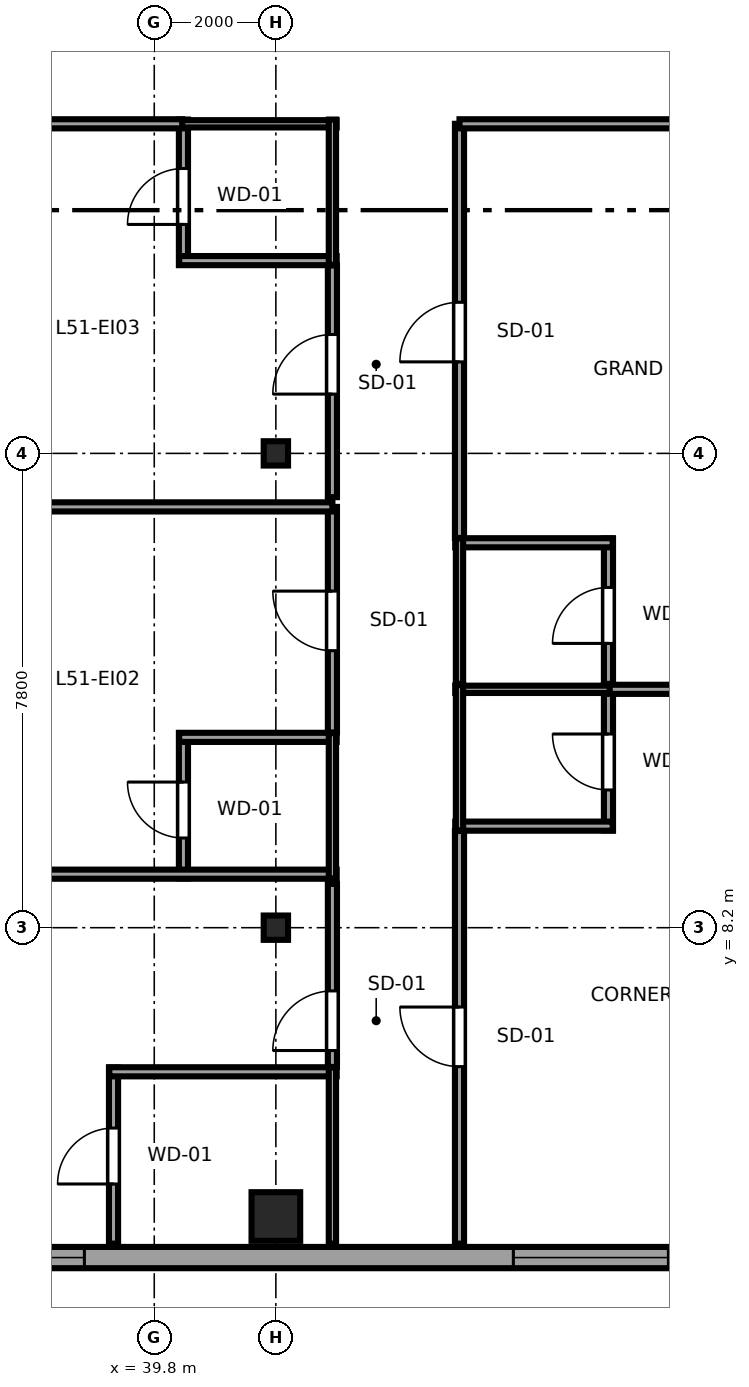
"""IFC4 building model, lengths in metres.
Left out: names, types, materials, properties, quantities, classifications, styles, units other than length and angle.
Written with IfcOpenShell. Run it as: python <this file> out.ifc"""

import sys

from ifc_helpers import new_model, si_unit, direction, frame, frame_2d, origin, origin_2d, place, context, subcontext, project, spatial, rectangle, i_section, extrude, source, transform, mapped, element, fill, save


model = new_model("IFC4")
c1 = context("Model", 3, precision=1e-05, world=origin(), true_north=direction((0.0, 1.0)))
c2 = subcontext(c1, "Body", "Model", "MODEL_VIEW")
j1 = project(units=[si_unit("LENGTHUNIT", "METRE"), si_unit("PLANEANGLEUNIT", "RADIAN")], contexts=[c1])
p1 = place(None, origin())
s1 = spatial("IfcSite", under=j1, at=p1, CompositionType="ELEMENT")
p2 = place(p1, origin())
s2 = spatial("IfcBuilding", under=s1, at=p2, CompositionType="ELEMENT")
p3 = place(p2, frame((0.0, 0.0, 194.65)))
s3 = spatial("IfcBuildingStorey", under=s2, at=p3, CompositionType="ELEMENT", Elevation=194.65)
m1 = source(origin(), c2, "Body", "SweptSolid", [
    extrude(rectangle(XDim=0.8, YDim=0.8, at=origin_2d()), origin(), (0.0, 0.0, 1.0), 3.55),
])
p4 = place(p3, frame((41.8, 3.45, 0.0), z_axis=(0.0, 0.0, 1.0), x_axis=(1.0, 0.0, 0.0)))
e1 = element("IfcColumn", 1, at=p4, inside=s3, PredefinedType="COLUMN", context=c2, shape_type="MappedRepresentation", body=[
    mapped(m1, transform((0.0, 0.0, 0.0), x_axis=(1.0, 0.0, 0.0), y_axis=(0.0, 1.0, 0.0), z_axis=(0.0, 0.0, 1.0), scale=1.0)),
])
m2 = source(origin(), c2, "Body", "SweptSolid", [
    extrude(i_section(OverallWidth=0.4, OverallDepth=0.4, WebThickness=0.02, FlangeThickness=0.035, at=origin_2d()), origin(), (0.0, 0.0, 1.0), 3.55),
])
for number, where, z_axis, x_axis in (
    (2, (41.8, 8.2, 0.0), (0.0, 0.0, 1.0), (1.0, 0.0, 0.0)),
    (3, (41.8, 16.0, 0.0), (0.0, 0.0, 1.0), (1.0, 0.0, 0.0)),
):
    element("IfcColumn", number, at=place(p3, frame(where, z_axis=z_axis, x_axis=x_axis)), inside=s3, PredefinedType="COLUMN", context=c2, shape_type="MappedRepresentation", body=[
        mapped(m2, transform((0.0, 0.0, 0.0), x_axis=(1.0, 0.0, 0.0), y_axis=(0.0, 1.0, 0.0), z_axis=(0.0, 0.0, 1.0), scale=1.0)),
    ])
p5 = place(p3, frame((34.375, 2.775, 0.0), z_axis=(0.0, 0.0, 1.0), x_axis=(1.0, 0.0, 0.0)))
e4 = element("IfcWall", 4, at=p5, inside=s3, PredefinedType="SOLIDWALL", context=c2, shape_type="SweptSolid", body=[
    extrude(rectangle(XDim=15.608, YDim=0.35, at=frame_2d((7.804, 0.0))), origin(), (0.0, 0.0, 1.0), 3.37),
])
p6 = place(p5, frame((1.726, 0.0, 0.68)))
e5 = element("IfcOpeningElement", 5, at=p6, cuts=e4, PredefinedType="OPENING", context=c2, shape_type="SweptSolid", body=[
    extrude(rectangle(XDim=2.55, YDim=1.92, at=frame_2d((1.275, 0.96))), frame((0.0, 0.185, 0.0), z_axis=(0.0, -1.0, 0.0), x_axis=(1.0, 0.0, 0.0)), (0.0, 0.0, 1.0), 0.37),
])
p7 = place(p5, frame((11.331, 0.0, 0.68)))
e6 = element("IfcOpeningElement", 6, at=p7, cuts=e4, PredefinedType="OPENING", context=c2, shape_type="SweptSolid", body=[
    extrude(rectangle(XDim=2.55, YDim=1.92, at=frame_2d((1.275, 0.96))), frame((0.0, 0.185, 0.0), z_axis=(0.0, -1.0, 0.0), x_axis=(1.0, 0.0, 0.0)), (0.0, 0.0, 1.0), 0.37),
])
p8 = place(p3, frame((39.13, 3.005, 0.0), z_axis=(0.0, 0.0, 1.0), x_axis=(0.0, 1.0, 0.0)))
e7 = element("IfcWall", 7, at=p8, inside=s3, PredefinedType="PARTITIONING", context=c2, shape_type="SweptSolid", body=[
    extrude(rectangle(XDim=2.895, YDim=0.15, at=frame_2d((1.448, 0.0))), origin(), (0.0, 0.0, 1.0), 3.37),
])
p9 = place(p8, frame((0.98, 0.0, 0.0)))
e8 = element("IfcOpeningElement", 8, at=p9, cuts=e7, PredefinedType="OPENING", context=c2, shape_type="SweptSolid", body=[
    extrude(rectangle(XDim=0.92, YDim=2.01, at=frame_2d((0.46, 1.005))), frame((0.0, 0.085, 0.0), z_axis=(0.0, -1.0, 0.0), x_axis=(1.0, 0.0, 0.0)), (0.0, 0.0, 1.0), 0.17),
])
p10 = place(p3, frame((39.06, 5.83, 0.0), z_axis=(0.0, 0.0, 1.0), x_axis=(1.0, 0.0, 0.0)))
e9 = element("IfcWall", 9, at=p10, inside=s3, PredefinedType="PARTITIONING", context=c2, shape_type="SweptSolid", body=[
    extrude(rectangle(XDim=3.74, YDim=0.15, at=frame_2d((1.87, 0.0))), origin(), (0.0, 0.0, 1.0), 3.37),
])
p11 = place(p3, frame((42.73, 3.005, 0.0), z_axis=(0.0, 0.0, 1.0), x_axis=(0.0, 1.0, 0.0)))
e10 = element("IfcWall", 10, at=p11, inside=s3, PredefinedType="PLUMBINGWALL", context=c2, shape_type="SweptSolid", body=[
    extrude(rectangle(XDim=2.895, YDim=0.12, at=frame_2d((1.448, 0.0))), origin(), (0.0, 0.0, 1.0), 3.37),
])
p12 = place(p3, frame((40.28, 9.01, 0.0), z_axis=(0.0, 0.0, 1.0), x_axis=(0.0, 1.0, 0.0)))
e11 = element("IfcWall", 11, at=p12, inside=s3, PredefinedType="PARTITIONING", context=c2, shape_type="SweptSolid", body=[
    extrude(rectangle(XDim=2.39, YDim=0.15, at=frame_2d((1.195, 0.0))), origin(), (0.0, 0.0, 1.0), 3.37),
])
p13 = place(p12, frame((0.665, 0.0, 0.0)))
e12 = element("IfcOpeningElement", 12, at=p13, cuts=e11, PredefinedType="OPENING", context=c2, shape_type="SweptSolid", body=[
    extrude(rectangle(XDim=0.92, YDim=2.01, at=frame_2d((0.46, 1.005))), frame((0.0, 0.085, 0.0), z_axis=(0.0, -1.0, 0.0), x_axis=(1.0, 0.0, 0.0)), (0.0, 0.0, 1.0), 0.17),
])
p14 = place(p3, frame((34.65, 9.08, 0.0), z_axis=(0.0, 0.0, 1.0), x_axis=(1.0, 0.0, 0.0)))
e13 = element("IfcWall", 13, at=p14, inside=s3, PredefinedType="PARTITIONING", context=c2, shape_type="SweptSolid", body=[
    extrude(rectangle(XDim=8.15, YDim=0.15, at=frame_2d((4.075, 0.0))), origin(), (0.0, 0.0, 1.0), 3.37),
])
p15 = place(p3, frame((40.21, 11.33, 0.0), z_axis=(0.0, 0.0, 1.0), x_axis=(1.0, 0.0, 0.0)))
e14 = element("IfcWall", 14, at=p15, inside=s3, PredefinedType="PARTITIONING", context=c2, shape_type="SweptSolid", body=[
    extrude(rectangle(XDim=2.59, YDim=0.15, at=frame_2d((1.295, 0.0))), origin(), (0.0, 0.0, 1.0), 3.37),
])
p16 = place(p3, frame((42.73, 9.01, 0.0), z_axis=(0.0, 0.0, 1.0), x_axis=(0.0, 1.0, 0.0)))
e15 = element("IfcWall", 15, at=p16, inside=s3, PredefinedType="PLUMBINGWALL", context=c2, shape_type="SweptSolid", body=[
    extrude(rectangle(XDim=2.39, YDim=0.12, at=frame_2d((1.195, 0.0))), origin(), (0.0, 0.0, 1.0), 3.37),
])
p17 = place(p3, frame((40.28, 19.1, 0.0), z_axis=(0.0, 0.0, 1.0), x_axis=(0.0, 1.0, 0.0)))
e16 = element("IfcWall", 16, at=p17, inside=s3, PredefinedType="PARTITIONING", context=c2, shape_type="SweptSolid", body=[
    extrude(rectangle(XDim=2.39, YDim=0.15, at=frame_2d((1.195, 0.0))), origin(), (0.0, 0.0, 1.0), 3.37),
])
p18 = place(p17, frame((0.665, 0.0, 0.0)))
e17 = element("IfcOpeningElement", 17, at=p18, cuts=e16, PredefinedType="OPENING", context=c2, shape_type="SweptSolid", body=[
    extrude(rectangle(XDim=0.92, YDim=2.01, at=frame_2d((0.46, 1.005))), frame((0.0, 0.085, 0.0), z_axis=(0.0, -1.0, 0.0), x_axis=(1.0, 0.0, 0.0)), (0.0, 0.0, 1.0), 0.17),
])
p19 = place(p3, frame((40.21, 19.17, 0.0), z_axis=(0.0, 0.0, 1.0), x_axis=(1.0, 0.0, 0.0)))
e18 = element("IfcWall", 18, at=p19, inside=s3, PredefinedType="PARTITIONING", context=c2, shape_type="SweptSolid", body=[
    extrude(rectangle(XDim=2.59, YDim=0.15, at=frame_2d((1.295, 0.0))), origin(), (0.0, 0.0, 1.0), 3.37),
])
p20 = place(p3, frame((40.21, 21.42, 0.0), z_axis=(0.0, 0.0, 1.0), x_axis=(1.0, 0.0, 0.0)))
e19 = element("IfcWall", 19, at=p20, inside=s3, PredefinedType="PLUMBINGWALL", context=c2, shape_type="SweptSolid", body=[
    extrude(rectangle(XDim=2.59, YDim=0.12, at=frame_2d((1.295, 0.0))), origin(), (0.0, 0.0, 1.0), 3.37),
])
p21 = place(p3, frame((42.73, 19.1, 0.0), z_axis=(0.0, 0.0, 1.0), x_axis=(0.0, 1.0, 0.0)))
e20 = element("IfcWall", 20, at=p21, inside=s3, PredefinedType="PLUMBINGWALL", context=c2, shape_type="SweptSolid", body=[
    extrude(rectangle(XDim=2.39, YDim=0.12, at=frame_2d((1.195, 0.0))), origin(), (0.0, 0.0, 1.0), 3.37),
])
p22 = place(p3, frame((47.27, 9.8, 0.0), z_axis=(0.0, 0.0, 1.0), x_axis=(0.0, 1.0, 0.0)))
e21 = element("IfcWall", 21, at=p22, inside=s3, PredefinedType="PARTITIONING", context=c2, shape_type="SweptSolid", body=[
    extrude(rectangle(XDim=2.39, YDim=0.15, at=frame_2d((1.195, 0.0))), origin(), (0.0, 0.0, 1.0), 3.37),
])
p23 = place(p22, frame((0.665, 0.0, 0.0)))
e22 = element("IfcOpeningElement", 22, at=p23, cuts=e21, PredefinedType="OPENING", context=c2, shape_type="SweptSolid", body=[
    extrude(rectangle(XDim=0.92, YDim=2.01, at=frame_2d((0.46, 1.005))), frame((0.0, 0.085, 0.0), z_axis=(0.0, -1.0, 0.0), x_axis=(1.0, 0.0, 0.0)), (0.0, 0.0, 1.0), 0.17),
])
p24 = place(p3, frame((44.75, 9.87, 0.0), z_axis=(0.0, 0.0, 1.0), x_axis=(1.0, 0.0, 0.0)))
e23 = element("IfcWall", 23, at=p24, inside=s3, PredefinedType="PARTITIONING", context=c2, shape_type="SweptSolid", body=[
    extrude(rectangle(XDim=2.59, YDim=0.15, at=frame_2d((1.295, 0.0))), origin(), (0.0, 0.0, 1.0), 3.37),
])
p25 = place(p3, frame((44.75, 12.12, 0.0), z_axis=(0.0, 0.0, 1.0), x_axis=(1.0, 0.0, 0.0)))
e24 = element("IfcWall", 24, at=p25, inside=s3, PredefinedType="PLUMBINGWALL", context=c2, shape_type="SweptSolid", body=[
    extrude(rectangle(XDim=2.59, YDim=0.12, at=frame_2d((1.295, 0.0))), origin(), (0.0, 0.0, 1.0), 3.37),
])
p26 = place(p3, frame((44.82, 9.8, 0.0), z_axis=(0.0, 0.0, 1.0), x_axis=(0.0, 1.0, 0.0)))
e25 = element("IfcWall", 25, at=p26, inside=s3, PredefinedType="PLUMBINGWALL", context=c2, shape_type="SweptSolid", body=[
    extrude(rectangle(XDim=2.39, YDim=0.12, at=frame_2d((1.195, 0.0))), origin(), (0.0, 0.0, 1.0), 3.37),
])
p27 = place(p3, frame((47.27, 12.21, 0.0), z_axis=(0.0, 0.0, 1.0), x_axis=(0.0, 1.0, 0.0)))
e26 = element("IfcWall", 26, at=p27, inside=s3, PredefinedType="PARTITIONING", context=c2, shape_type="SweptSolid", body=[
    extrude(rectangle(XDim=2.39, YDim=0.15, at=frame_2d((1.195, 0.0))), origin(), (0.0, 0.0, 1.0), 3.37),
])
p28 = place(p27, frame((0.665, 0.0, 0.0)))
e27 = element("IfcOpeningElement", 27, at=p28, cuts=e26, PredefinedType="OPENING", context=c2, shape_type="SweptSolid", body=[
    extrude(rectangle(XDim=0.92, YDim=2.01, at=frame_2d((0.46, 1.005))), frame((0.0, 0.085, 0.0), z_axis=(0.0, -1.0, 0.0), x_axis=(1.0, 0.0, 0.0)), (0.0, 0.0, 1.0), 0.17),
])
p29 = place(p3, frame((44.75, 14.53, 0.0), z_axis=(0.0, 0.0, 1.0), x_axis=(1.0, 0.0, 0.0)))
e28 = element("IfcWall", 28, at=p29, inside=s3, PredefinedType="PARTITIONING", context=c2, shape_type="SweptSolid", body=[
    extrude(rectangle(XDim=2.59, YDim=0.15, at=frame_2d((1.295, 0.0))), origin(), (0.0, 0.0, 1.0), 3.37),
])
p30 = place(p3, frame((44.82, 12.21, 0.0), z_axis=(0.0, 0.0, 1.0), x_axis=(0.0, 1.0, 0.0)))
e29 = element("IfcWall", 29, at=p30, inside=s3, PredefinedType="PLUMBINGWALL", context=c2, shape_type="SweptSolid", body=[
    extrude(rectangle(XDim=2.39, YDim=0.12, at=frame_2d((1.195, 0.0))), origin(), (0.0, 0.0, 1.0), 3.37),
])
p31 = place(p3, frame((42.73, 5.91, 0.0), z_axis=(0.0, 0.0, 1.0), x_axis=(0.0, 1.0, 0.0)))
e30 = element("IfcWall", 30, at=p31, inside=s3, PredefinedType="PARTITIONING", context=c2, shape_type="SweptSolid", body=[
    extrude(rectangle(XDim=3.01, YDim=0.15, at=frame_2d((1.505, 0.0))), origin(), (0.0, 0.0, 1.0), 3.37),
])
p32 = place(p31, frame((0.27, 0.0, 0.0)))
e31 = element("IfcOpeningElement", 31, at=p32, cuts=e30, PredefinedType="OPENING", context=c2, shape_type="SweptSolid", body=[
    extrude(rectangle(XDim=0.98, YDim=2.12, at=frame_2d((0.49, 1.06))), frame((0.0, 0.085, 0.0), z_axis=(0.0, -1.0, 0.0), x_axis=(1.0, 0.0, 0.0)), (0.0, 0.0, 1.0), 0.17),
])
p33 = place(p3, frame((42.73, 11.41, 0.0), z_axis=(0.0, 0.0, 1.0), x_axis=(0.0, 1.0, 0.0)))
e32 = element("IfcWall", 32, at=p33, inside=s3, PredefinedType="PARTITIONING", context=c2, shape_type="SweptSolid", body=[
    extrude(rectangle(XDim=3.71, YDim=0.15, at=frame_2d((1.855, 0.0))), origin(), (0.0, 0.0, 1.0), 3.37),
])
p34 = place(p33, frame((1.345, 0.0, 0.0)))
e33 = element("IfcOpeningElement", 33, at=p34, cuts=e32, PredefinedType="OPENING", context=c2, shape_type="SweptSolid", body=[
    extrude(rectangle(XDim=0.98, YDim=2.12, at=frame_2d((0.49, 1.06))), frame((0.0, 0.085, 0.0), z_axis=(0.0, -1.0, 0.0), x_axis=(1.0, 0.0, 0.0)), (0.0, 0.0, 1.0), 0.17),
])
p35 = place(p3, frame((34.65, 15.12, 0.0), z_axis=(0.0, 0.0, 1.0), x_axis=(1.0, 0.0, 0.0)))
e34 = element("IfcWall", 34, at=p35, inside=s3, PredefinedType="PARTITIONING", context=c2, shape_type="SweptSolid", body=[
    extrude(rectangle(XDim=8.08, YDim=0.15, at=frame_2d((4.04, 0.0))), origin(), (0.0, 0.0, 1.0), 3.37),
])
p36 = place(p3, frame((42.73, 15.28, 0.0), z_axis=(0.0, 0.0, 1.0), x_axis=(0.0, 1.0, 0.0)))
e35 = element("IfcWall", 35, at=p36, inside=s3, PredefinedType="PARTITIONING", context=c2, shape_type="SweptSolid", body=[
    extrude(rectangle(XDim=3.81, YDim=0.15, at=frame_2d((1.905, 0.0))), origin(), (0.0, 0.0, 1.0), 3.37),
])
p37 = place(p36, frame((1.695, 0.0, 0.0)))
e36 = element("IfcOpeningElement", 36, at=p37, cuts=e35, PredefinedType="OPENING", context=c2, shape_type="SweptSolid", body=[
    extrude(rectangle(XDim=0.98, YDim=2.12, at=frame_2d((0.49, 1.06))), frame((0.0, 0.085, 0.0), z_axis=(0.0, -1.0, 0.0), x_axis=(1.0, 0.0, 0.0)), (0.0, 0.0, 1.0), 0.17),
])
p38 = place(p3, frame((34.65, 21.42, 0.0), z_axis=(0.0, 0.0, 1.0), x_axis=(1.0, 0.0, 0.0)))
e37 = element("IfcWall", 37, at=p38, inside=s3, PredefinedType="PARTITIONING", context=c2, shape_type="SweptSolid", body=[
    extrude(rectangle(XDim=5.61, YDim=0.15, at=frame_2d((2.805, 0.0))), origin(), (0.0, 0.0, 1.0), 3.37),
])
p39 = place(p3, frame((44.82, 3.005, 0.0), z_axis=(0.0, 0.0, 1.0), x_axis=(0.0, 1.0, 0.0)))
e38 = element("IfcWall", 38, at=p39, inside=s3, PredefinedType="PARTITIONING", context=c2, shape_type="SweptSolid", body=[
    extrude(rectangle(XDim=6.785, YDim=0.15, at=frame_2d((3.393, 0.0))), origin(), (0.0, 0.0, 1.0), 3.37),
])
p40 = place(p39, frame((2.91, 0.0, 0.0)))
e39 = element("IfcOpeningElement", 39, at=p40, cuts=e38, PredefinedType="OPENING", context=c2, shape_type="SweptSolid", body=[
    extrude(rectangle(XDim=0.98, YDim=2.12, at=frame_2d((0.49, 1.06))), frame((0.0, 0.085, 0.0), z_axis=(0.0, -1.0, 0.0), x_axis=(1.0, 0.0, 0.0)), (0.0, 0.0, 1.0), 0.17),
])
p41 = place(p3, frame((47.29, 12.12, 0.0), z_axis=(0.0, 0.0, 1.0), x_axis=(1.0, 0.0, 0.0)))
e40 = element("IfcWall", 40, at=p41, inside=s3, PredefinedType="PARTITIONING", context=c2, shape_type="SweptSolid", body=[
    extrude(rectangle(XDim=6.705, YDim=0.15, at=frame_2d((3.353, 0.0))), origin(), (0.0, 0.0, 1.0), 3.37),
])
p42 = place(p3, frame((44.82, 14.61, 0.0), z_axis=(0.0, 0.0, 1.0), x_axis=(0.0, 1.0, 0.0)))
e41 = element("IfcWall", 41, at=p42, inside=s3, PredefinedType="PARTITIONING", context=c2, shape_type="SweptSolid", body=[
    extrude(rectangle(XDim=6.81, YDim=0.15, at=frame_2d((3.405, 0.0))), origin(), (0.0, 0.0, 1.0), 3.37),
])
p43 = place(p42, frame((2.895, 0.0, 0.0)))
e42 = element("IfcOpeningElement", 42, at=p43, cuts=e41, PredefinedType="OPENING", context=c2, shape_type="SweptSolid", body=[
    extrude(rectangle(XDim=0.98, YDim=2.12, at=frame_2d((0.49, 1.06))), frame((0.0, 0.085, 0.0), z_axis=(0.0, -1.0, 0.0), x_axis=(1.0, 0.0, 0.0)), (0.0, 0.0, 1.0), 0.17),
])
p44 = place(p3, frame((44.82, 21.42, 0.0), z_axis=(0.0, 0.0, 1.0), x_axis=(1.0, 0.0, 0.0)))
e43 = element("IfcWall", 43, at=p44, inside=s3, PredefinedType="PARTITIONING", context=c2, shape_type="SweptSolid", body=[
    extrude(rectangle(XDim=9.175, YDim=0.15, at=frame_2d((4.587, 0.0))), origin(), (0.0, 0.0, 1.0), 3.37),
])
m3 = source(origin(), c2, "Body", "SweptSolid", [
    extrude(rectangle(XDim=2.55, YDim=1.92, at=frame_2d((1.275, 0.96))), frame((0.0, 0.09, 0.0), z_axis=(0.0, -1.0, 0.0), x_axis=(1.0, 0.0, 0.0)), (0.0, 0.0, 1.0), 0.06),
])
p45 = place(p6, origin())
e44 = element("IfcWindow", 44, at=p45, inside=s3, PartitioningType="TRIPLE_PANEL_HORIZONTAL", PredefinedType="WINDOW", context=c2, shape_type="MappedRepresentation", body=[
    mapped(m3, transform((0.0, 0.0, 0.0), x_axis=(1.0, 0.0, 0.0), y_axis=(0.0, 1.0, 0.0), z_axis=(0.0, 0.0, 1.0), scale=1.0)),
])
fill(e5, e44)
p46 = place(p7, origin())
e45 = element("IfcWindow", 45, at=p46, inside=s3, PartitioningType="TRIPLE_PANEL_HORIZONTAL", PredefinedType="WINDOW", context=c2, shape_type="MappedRepresentation", body=[
    mapped(m3, transform((0.0, 0.0, 0.0), x_axis=(1.0, 0.0, 0.0), y_axis=(0.0, 1.0, 0.0), z_axis=(0.0, 0.0, 1.0), scale=1.0)),
])
fill(e6, e45)
m4 = source(origin(), c2, "Body", "SweptSolid", [
    extrude(rectangle(XDim=0.92, YDim=2.01, at=frame_2d((0.46, 1.005))), frame((0.0, 0.025, 0.0), z_axis=(0.0, -1.0, 0.0), x_axis=(1.0, 0.0, 0.0)), (0.0, 0.0, 1.0), 0.05),
])
p47 = place(p9, origin())
e46 = element("IfcDoor", 46, at=p47, inside=s3, OperationType="SINGLE_SWING_LEFT", PredefinedType="DOOR", context=c2, shape_type="MappedRepresentation", body=[
    mapped(m4, transform((0.0, 0.0, 0.0), x_axis=(1.0, 0.0, 0.0), y_axis=(0.0, 1.0, 0.0), z_axis=(0.0, 0.0, 1.0), scale=1.0)),
])
fill(e8, e46)
p48 = place(p13, origin())
e47 = element("IfcDoor", 47, at=p48, inside=s3, OperationType="SINGLE_SWING_RIGHT", PredefinedType="DOOR", context=c2, shape_type="MappedRepresentation", body=[
    mapped(m4, transform((0.0, 0.0, 0.0), x_axis=(1.0, 0.0, 0.0), y_axis=(0.0, 1.0, 0.0), z_axis=(0.0, 0.0, 1.0), scale=1.0)),
])
fill(e12, e47)
p49 = place(p18, origin())
e48 = element("IfcDoor", 48, at=p49, inside=s3, OperationType="SINGLE_SWING_LEFT", PredefinedType="DOOR", context=c2, shape_type="MappedRepresentation", body=[
    mapped(m4, transform((0.0, 0.0, 0.0), x_axis=(1.0, 0.0, 0.0), y_axis=(0.0, 1.0, 0.0), z_axis=(0.0, 0.0, 1.0), scale=1.0)),
])
fill(e17, e48)
p50 = place(p23, origin())
e49 = element("IfcDoor", 49, at=p50, inside=s3, OperationType="SINGLE_SWING_RIGHT", PredefinedType="DOOR", context=c2, shape_type="MappedRepresentation", body=[
    mapped(m4, transform((0.0, 0.0, 0.0), x_axis=(1.0, 0.0, 0.0), y_axis=(0.0, 1.0, 0.0), z_axis=(0.0, 0.0, 1.0), scale=1.0)),
])
fill(e22, e49)
p51 = place(p28, origin())
e50 = element("IfcDoor", 50, at=p51, inside=s3, OperationType="SINGLE_SWING_LEFT", PredefinedType="DOOR", context=c2, shape_type="MappedRepresentation", body=[
    mapped(m4, transform((0.0, 0.0, 0.0), x_axis=(1.0, 0.0, 0.0), y_axis=(0.0, 1.0, 0.0), z_axis=(0.0, 0.0, 1.0), scale=1.0)),
])
fill(e27, e50)
m5 = source(origin(), c2, "Body", "SweptSolid", [
    extrude(rectangle(XDim=0.98, YDim=2.12, at=frame_2d((0.49, 1.06))), frame((0.0, 0.025, 0.0), z_axis=(0.0, -1.0, 0.0), x_axis=(1.0, 0.0, 0.0)), (0.0, 0.0, 1.0), 0.05),
])
p52 = place(p32, origin())
e51 = element("IfcDoor", 51, at=p52, inside=s3, OperationType="SINGLE_SWING_LEFT", PredefinedType="DOOR", context=c2, shape_type="MappedRepresentation", body=[
    mapped(m5, transform((0.0, 0.0, 0.0), x_axis=(1.0, 0.0, 0.0), y_axis=(0.0, 1.0, 0.0), z_axis=(0.0, 0.0, 1.0), scale=1.0)),
])
fill(e31, e51)
p53 = place(p34, origin())
e52 = element("IfcDoor", 52, at=p53, inside=s3, OperationType="SINGLE_SWING_RIGHT", PredefinedType="DOOR", context=c2, shape_type="MappedRepresentation", body=[
    mapped(m5, transform((0.0, 0.0, 0.0), x_axis=(1.0, 0.0, 0.0), y_axis=(0.0, 1.0, 0.0), z_axis=(0.0, 0.0, 1.0), scale=1.0)),
])
fill(e33, e52)
p54 = place(p37, origin())
e53 = element("IfcDoor", 53, at=p54, inside=s3, OperationType="SINGLE_SWING_LEFT", PredefinedType="DOOR", context=c2, shape_type="MappedRepresentation", body=[
    mapped(m5, transform((0.0, 0.0, 0.0), x_axis=(1.0, 0.0, 0.0), y_axis=(0.0, 1.0, 0.0), z_axis=(0.0, 0.0, 1.0), scale=1.0)),
])
fill(e36, e53)
p55 = place(p40, origin())
e54 = element("IfcDoor", 54, at=p55, inside=s3, OperationType="SINGLE_SWING_RIGHT", PredefinedType="DOOR", context=c2, shape_type="MappedRepresentation", body=[
    mapped(m5, transform((0.0, 0.0, 0.0), x_axis=(1.0, 0.0, 0.0), y_axis=(0.0, 1.0, 0.0), z_axis=(0.0, 0.0, 1.0), scale=1.0)),
])
fill(e39, e54)
p56 = place(p43, origin())
e55 = element("IfcDoor", 55, at=p56, inside=s3, OperationType="SINGLE_SWING_LEFT", PredefinedType="DOOR", context=c2, shape_type="MappedRepresentation", body=[
    mapped(m5, transform((0.0, 0.0, 0.0), x_axis=(1.0, 0.0, 0.0), y_axis=(0.0, 1.0, 0.0), z_axis=(0.0, 0.0, 1.0), scale=1.0)),
])
fill(e42, e55)
save(model, sys.argv[1])
